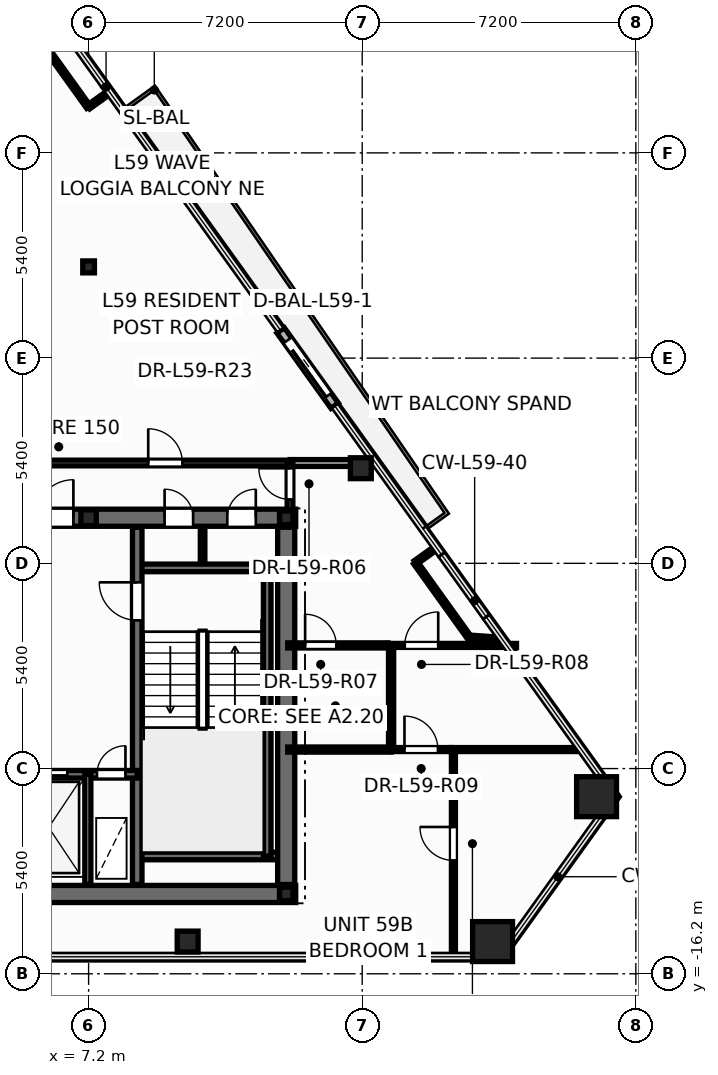
"""IFC4 building model, lengths in metres.
Left out: names, types, materials, properties, quantities, classifications, styles, units other than length and angle.
Written with IfcOpenShell. Run it as: python <this file> out.ifc"""

import sys

from ifc_helpers import new_model, si_unit, direction, frame, frame_2d, origin, origin_2d, place, context, subcontext, project, spatial, rectangle, hollow_rectangle, hollow_circle, i_section, extrude, element, fill, save


model = new_model("IFC4")
c1 = context("Model", 3, precision=1e-05, world=origin(), true_north=direction((0.0, 1.0)))
c2 = subcontext(c1, "Body", "Model", "MODEL_VIEW")
j1 = project(units=[si_unit("LENGTHUNIT", "METRE"), si_unit("PLANEANGLEUNIT", "RADIAN")], contexts=[c1])
p1 = place(None, origin())
s1 = spatial("IfcSite", under=j1, at=p1, CompositionType="ELEMENT")
p2 = place(p1, origin())
s2 = spatial("IfcBuilding", under=s1, at=p2, CompositionType="ELEMENT")
p3 = place(p2, frame((0.0, 0.0, 225.3)))
s3 = spatial("IfcBuildingStorey", under=s2, at=p3, CompositionType="ELEMENT", Elevation=225.3)
for number, where, z_axis, x_axis in (
    (1, (17.83, -15.352, 0.0), (0.0, 0.0, 1.0), (1.0, 0.0, 0.0)),
    (2, (20.567, -11.54, 0.0), (0.0, 0.0, 1.0), (1.0, 0.0, 0.0)),
):
    element("IfcColumn", number, at=place(p3, frame(where, z_axis=z_axis, x_axis=x_axis)), inside=s3, PredefinedType="COLUMN", context=c2, shape_type="SweptSolid", body=[
        extrude(hollow_rectangle(XDim=1.05, YDim=1.05, WallThickness=0.045, at=origin_2d()), origin(), (0.0, 0.0, 1.0), 3.6),
    ])
for number, where, z_axis, x_axis in (
    (3, (9.807, -15.352, 0.0), (0.0, 0.0, 1.0), (1.0, 0.0, 0.0)),
    (4, (14.363, -2.897, 0.0), (0.0, 0.0, 1.0), (1.0, 0.0, 0.0)),
    (5, (9.046, 4.51, 0.0), (0.0, 0.0, 1.0), (1.0, 0.0, 0.0)),
):
    element("IfcColumn", number, at=place(p3, frame(where, z_axis=z_axis, x_axis=x_axis)), inside=s3, PredefinedType="COLUMN", context=c2, shape_type="SweptSolid", body=[
        extrude(hollow_circle(Radius=0.275, WallThickness=0.024, at=origin_2d()), origin(), (0.0, 0.0, 1.0), 3.6),
    ])
for number, where, z_axis, x_axis in (
    (6, (12.4, -14.1, 0.0), (0.0, 0.0, 1.0), (1.0, 0.0, 0.0)),
    (7, (12.4, -4.2, 0.0), (0.0, 0.0, 1.0), (1.0, 0.0, 0.0)),
):
    element("IfcColumn", number, at=place(p3, frame(where, z_axis=z_axis, x_axis=x_axis)), inside=s3, PredefinedType="COLUMN", context=c2, shape_type="SweptSolid", body=[
        extrude(i_section(OverallWidth=0.352, OverallDepth=0.359, WebThickness=0.018, FlangeThickness=0.026, at=origin_2d()), origin(), (0.0, 0.0, 1.0), 3.6),
    ])
p4 = place(p3, frame((7.2, -4.2, 0.0), z_axis=(0.0, 0.0, 1.0), x_axis=(1.0, 0.0, 0.0)))
e8 = element("IfcColumn", 8, at=p4, inside=s3, PredefinedType="PILASTER", context=c2, shape_type="SweptSolid", body=[
    extrude(i_section(OverallWidth=0.405, OverallDepth=0.414, WebThickness=0.022, FlangeThickness=0.032, at=origin_2d()), origin(), (0.0, 0.0, 1.0), 3.6),
])
p5 = place(p3, frame((7.2, 2.4, 0.0), z_axis=(0.0, 0.0, 1.0), x_axis=(1.0, 0.0, 0.0)))
e9 = element("IfcColumn", 9, at=p5, inside=s3, PredefinedType="COLUMN", context=c2, shape_type="SweptSolid", body=[
    extrude(i_section(OverallWidth=0.307, OverallDepth=0.314, WebThickness=0.012, FlangeThickness=0.019, at=origin_2d()), origin(), (0.0, 0.0, 1.0), 3.6),
])
p6 = place(p3, frame((13.675, -1.252, -0.015), z_axis=(0.0, 0.0, 1.0), x_axis=(-0.583139062732, 0.812372349059, 0.0)))
e10 = element("IfcWall", 10, at=p6, inside=s3, PredefinedType="STANDARD", context=c2, shape_type="SweptSolid", body=[
    extrude(rectangle(XDim=2.44, YDim=0.24, at=frame_2d((1.22, 0.0))), origin(), (0.0, 0.0, 1.0), 2.853),
])
p7 = place(p6, frame((0.32, 0.0, 0.015)))
e11 = element("IfcOpeningElement", 11, at=p7, cuts=e10, PredefinedType="OPENING", context=c2, shape_type="SweptSolid", body=[
    extrude(rectangle(XDim=1.806, YDim=2.204, at=frame_2d((0.9, 1.102))), frame((0.0, 0.13, 0.0), z_axis=(0.0, -1.0, 0.0), x_axis=(1.0, 0.0, 0.0)), (0.0, 0.0, 1.0), 0.26),
])
p8 = place(p3, frame((10.2, -5.52, 0.0), z_axis=(0.0, 0.0, 1.0), x_axis=(0.0, 1.0, 0.0)))
e12 = element("IfcWall", 12, at=p8, inside=s3, PredefinedType="PARTITIONING", context=c2, shape_type="SweptSolid", body=[
    extrude(rectangle(XDim=1.12, YDim=0.12, at=frame_2d((0.56, 0.0))), origin(), (0.0, 0.0, 1.0), 3.32),
])
p9 = place(p3, frame((-12.65, -14.1, 0.0), z_axis=(0.0, 0.0, 1.0), x_axis=(1.0, 0.0, 0.0)))
e13 = element("IfcWall", 13, at=p9, inside=s3, PredefinedType="SHEAR", context=c2, shape_type="SweptSolid", body=[
    extrude(rectangle(XDim=25.3, YDim=0.45, at=frame_2d((12.65, 0.0))), origin(), (0.0, 0.0, 1.0), 3.6),
])
p10 = place(p3, frame((-12.65, -4.2, 0.0), z_axis=(0.0, 0.0, 1.0), x_axis=(1.0, 0.0, 0.0)))
e14 = element("IfcWall", 14, at=p10, inside=s3, PredefinedType="SHEAR", context=c2, shape_type="SweptSolid", body=[
    extrude(rectangle(XDim=25.3, YDim=0.45, at=frame_2d((12.65, 0.0))), origin(), (0.0, 0.0, 1.0), 3.6),
])
p11 = place(p10, frame((0.95, 0.0, 0.0)))
e15 = element("IfcOpeningElement", 15, at=p11, cuts=e14, PredefinedType="OPENING", context=c2, shape_type="SweptSolid", body=[
    extrude(rectangle(XDim=0.756, YDim=2.054, at=frame_2d((0.375, 1.027))), frame((0.0, 0.235, 0.0), z_axis=(0.0, -1.0, 0.0), x_axis=(1.0, 0.0, 0.0)), (0.0, 0.0, 1.0), 0.47),
])
p12 = place(p10, frame((2.6, 0.0, 0.0)))
e16 = element("IfcOpeningElement", 16, at=p12, cuts=e14, PredefinedType="OPENING", context=c2, shape_type="SweptSolid", body=[
    extrude(rectangle(XDim=0.756, YDim=2.054, at=frame_2d((0.375, 1.027))), frame((0.0, 0.235, 0.0), z_axis=(0.0, -1.0, 0.0), x_axis=(1.0, 0.0, 0.0)), (0.0, 0.0, 1.0), 0.47),
])
p13 = place(p10, frame((21.85, 0.0, 0.0)))
e17 = element("IfcOpeningElement", 17, at=p13, cuts=e14, PredefinedType="OPENING", context=c2, shape_type="SweptSolid", body=[
    extrude(rectangle(XDim=0.756, YDim=2.054, at=frame_2d((0.375, 1.027))), frame((0.0, 0.235, 0.0), z_axis=(0.0, -1.0, 0.0), x_axis=(1.0, 0.0, 0.0)), (0.0, 0.0, 1.0), 0.47),
])
p14 = place(p10, frame((23.5, 0.0, 0.0)))
e18 = element("IfcOpeningElement", 18, at=p14, cuts=e14, PredefinedType="OPENING", context=c2, shape_type="SweptSolid", body=[
    extrude(rectangle(XDim=0.756, YDim=2.054, at=frame_2d((0.375, 1.027))), frame((0.0, 0.235, 0.0), z_axis=(0.0, -1.0, 0.0), x_axis=(1.0, 0.0, 0.0)), (0.0, 0.0, 1.0), 0.47),
])
p15 = place(p10, frame((5.85, 0.0, 0.0)))
e19 = element("IfcOpeningElement", 19, at=p15, cuts=e14, PredefinedType="OPENING", context=c2, shape_type="SweptSolid", body=[
    extrude(rectangle(XDim=1.006, YDim=2.104, at=frame_2d((0.5, 1.052))), frame((0.0, 0.235, 0.0), z_axis=(0.0, -1.0, 0.0), x_axis=(1.0, 0.0, 0.0)), (0.0, 0.0, 1.0), 0.47),
])
p16 = place(p10, frame((10.35, 0.0, 0.0)))
e20 = element("IfcOpeningElement", 20, at=p16, cuts=e14, PredefinedType="OPENING", context=c2, shape_type="SweptSolid", body=[
    extrude(rectangle(XDim=1.406, YDim=2.154, at=frame_2d((0.7, 1.077))), frame((0.0, 0.235, 0.0), z_axis=(0.0, -1.0, 0.0), x_axis=(1.0, 0.0, 0.0)), (0.0, 0.0, 1.0), 0.47),
])
p17 = place(p10, frame((18.45, 0.0, 0.0)))
e21 = element("IfcOpeningElement", 21, at=p17, cuts=e14, PredefinedType="OPENING", context=c2, shape_type="SweptSolid", body=[
    extrude(rectangle(XDim=1.006, YDim=2.104, at=frame_2d((0.5, 1.052))), frame((0.0, 0.235, 0.0), z_axis=(0.0, -1.0, 0.0), x_axis=(1.0, 0.0, 0.0)), (0.0, 0.0, 1.0), 0.47),
])
for number, where, z_axis, x_axis in (
    (22, (8.48, -5.52, 0.0), (0.0, 0.0, 1.0), (1.0, 0.0, 0.0)),
    (23, (8.48, -13.1, 0.0), (0.0, 0.0, 1.0), (1.0, 0.0, 0.0)),
):
    element("IfcWall", number, at=place(p3, frame(where, z_axis=z_axis, x_axis=x_axis)), inside=s3, PredefinedType="SOLIDWALL", context=c2, shape_type="SweptSolid", body=[
        extrude(rectangle(XDim=3.87, YDim=0.2, at=frame_2d((1.935, 0.0))), origin(), (0.0, 0.0, 1.0), 3.6),
    ])
p18 = place(p3, frame((11.9, -13.1, 0.0), z_axis=(0.0, 0.0, 1.0), x_axis=(0.0, 1.0, 0.0)))
e24 = element("IfcWall", 24, at=p18, inside=s3, PredefinedType="SOLIDWALL", context=c2, shape_type="SweptSolid", body=[
    extrude(rectangle(XDim=7.58, YDim=0.2, at=frame_2d((3.79, 0.0))), origin(), (0.0, 0.0, 1.0), 3.6),
])
p19 = place(p3, frame((8.48, -13.85, 0.0), z_axis=(0.0, 0.0, 1.0), x_axis=(0.0, 1.0, 0.0)))
e25 = element("IfcWall", 25, at=p19, inside=s3, PredefinedType="SHEAR", context=c2, shape_type="SweptSolid", body=[
    extrude(rectangle(XDim=9.4, YDim=0.25, at=frame_2d((4.7, 0.0))), origin(), (0.0, 0.0, 1.0), 3.6),
])
p20 = place(p19, frame((6.95, 0.0, 0.0)))
e26 = element("IfcOpeningElement", 26, at=p20, cuts=e25, PredefinedType="OPENING", context=c2, shape_type="SweptSolid", body=[
    extrude(rectangle(XDim=1.006, YDim=2.104, at=frame_2d((0.5, 1.052))), frame((0.0, 0.135, 0.0), z_axis=(0.0, -1.0, 0.0), x_axis=(1.0, 0.0, 0.0)), (0.0, 0.0, 1.0), 0.27),
])
p21 = place(p3, frame((5.12, -10.95, 0.0), z_axis=(0.0, 0.0, 1.0), x_axis=(1.0, 0.0, 0.0)))
e27 = element("IfcWall", 27, at=p21, inside=s3, PredefinedType="SOLIDWALL", context=c2, shape_type="SweptSolid", body=[
    extrude(rectangle(XDim=3.36, YDim=0.2, at=frame_2d((1.68, 0.0))), origin(), (0.0, 0.0, 1.0), 3.6),
])
p22 = place(p21, frame((0.42, 0.0, 0.0)))
e28 = element("IfcOpeningElement", 28, at=p22, cuts=e27, PredefinedType="OPENING", context=c2, shape_type="SweptSolid", body=[
    extrude(rectangle(XDim=1.106, YDim=2.104, at=frame_2d((0.55, 1.052))), frame((0.0, 0.11, 0.0), z_axis=(0.0, -1.0, 0.0), x_axis=(1.0, 0.0, 0.0)), (0.0, 0.0, 1.0), 0.22),
])
p23 = place(p21, frame((2.3, 0.0, 0.0)))
e29 = element("IfcOpeningElement", 29, at=p23, cuts=e27, PredefinedType="OPENING", context=c2, shape_type="SweptSolid", body=[
    extrude(rectangle(XDim=0.756, YDim=2.054, at=frame_2d((0.375, 1.027))), frame((0.0, 0.11, 0.0), z_axis=(0.0, -1.0, 0.0), x_axis=(1.0, 0.0, 0.0)), (0.0, 0.0, 1.0), 0.22),
])
p24 = place(p3, frame((7.18, -13.85, 0.0), z_axis=(0.0, 0.0, 1.0), x_axis=(0.0, 1.0, 0.0)))
e30 = element("IfcWall", 30, at=p24, inside=s3, PredefinedType="PARTITIONING", context=c2, shape_type="SweptSolid", body=[
    extrude(rectangle(XDim=2.9, YDim=0.16, at=frame_2d((1.45, 0.0))), origin(), (0.0, 0.0, 1.0), 2.545),
])
p25 = place(p3, frame((12.4, -13.85, 0.0), z_axis=(0.0, 0.0, 1.0), x_axis=(0.0, 1.0, 0.0)))
e31 = element("IfcWall", 31, at=p25, inside=s3, PredefinedType="SHEAR", context=c2, shape_type="SweptSolid", body=[
    extrude(rectangle(XDim=9.4, YDim=0.45, at=frame_2d((4.7, 0.0))), origin(), (0.0, 0.0, 1.0), 3.6),
])
p26 = place(p3, frame((5.34, -2.76, 0.0), z_axis=(0.0, 0.0, 1.0), x_axis=(1.0, 0.0, 0.0)))
e32 = element("IfcWall", 32, at=p26, inside=s3, PredefinedType="PARTITIONING", context=c2, shape_type="SweptSolid", body=[
    extrude(rectangle(XDim=7.16, YDim=0.15, at=frame_2d((3.58, 0.0))), origin(), (0.0, 0.0, 1.0), 2.295),
])
p27 = place(p26, frame((3.429, 0.0, 0.0)))
e33 = element("IfcOpeningElement", 33, at=p27, cuts=e32, PredefinedType="OPENING", context=c2, shape_type="SweptSolid", body=[
    extrude(rectangle(XDim=0.906, YDim=2.104, at=frame_2d((0.45, 1.052))), frame((0.0, 0.085, 0.0), z_axis=(0.0, -1.0, 0.0), x_axis=(1.0, 0.0, 0.0)), (0.0, 0.0, 1.0), 0.17),
])
p28 = place(p3, frame((16.8, -15.752, 0.0), z_axis=(0.0, 0.0, 1.0), x_axis=(0.0, 1.0, 0.0)))
e34 = element("IfcWall", 34, at=p28, inside=s3, PredefinedType="PARTITIONING", context=c2, shape_type="SweptSolid", body=[
    extrude(rectangle(XDim=5.452, YDim=0.105, at=frame_2d((2.726, 0.0))), origin(), (0.0, 0.0, 1.0), 2.838),
])
p29 = place(p28, frame((2.536, 0.0, 0.0)))
e35 = element("IfcOpeningElement", 35, at=p29, cuts=e34, PredefinedType="OPENING", context=c2, shape_type="SweptSolid", body=[
    extrude(rectangle(XDim=0.886, YDim=2.104, at=frame_2d((0.44, 1.052))), frame((0.0, 0.062, 0.0), z_axis=(0.0, -1.0, 0.0), x_axis=(1.0, 0.0, 0.0)), (0.0, 0.0, 1.0), 0.125),
])
p30 = place(p3, frame((16.74, -10.3, 0.0), z_axis=(0.0, 0.0, 1.0), x_axis=(1.0, 0.0, 0.0)))
e36 = element("IfcWall", 36, at=p30, inside=s3, PredefinedType="PARTITIONING", context=c2, shape_type="SweptSolid", body=[
    extrude(rectangle(XDim=3.429, YDim=0.105, at=frame_2d((1.715, 0.0))), origin(), (0.0, 0.0, 1.0), 2.295),
])
p31 = place(p3, frame((15.08, -7.56, 0.0), z_axis=(0.0, 0.0, 1.0), x_axis=(1.0, 0.0, 0.0)))
e37 = element("IfcWall", 37, at=p31, inside=s3, PredefinedType="PARTITIONING", context=c2, shape_type="SweptSolid", body=[
    extrude(rectangle(XDim=3.38, YDim=0.105, at=frame_2d((1.69, 0.0))), origin(), (0.0, 0.0, 1.0), 2.295),
])
p32 = place(p31, frame((0.44, 0.0, 0.0)))
e38 = element("IfcOpeningElement", 38, at=p32, cuts=e37, PredefinedType="OPENING", context=c2, shape_type="SweptSolid", body=[
    extrude(rectangle(XDim=0.886, YDim=2.104, at=frame_2d((0.44, 1.052))), frame((0.0, 0.062, 0.0), z_axis=(0.0, -1.0, 0.0), x_axis=(1.0, 0.0, 0.0)), (0.0, 0.0, 1.0), 0.125),
])
p33 = place(p3, frame((12.44, -7.56, 0.0), z_axis=(0.0, 0.0, 1.0), x_axis=(1.0, 0.0, 0.0)))
e39 = element("IfcWall", 39, at=p33, inside=s3, PredefinedType="PARTITIONING", context=c2, shape_type="SweptSolid", body=[
    extrude(rectangle(XDim=2.638, YDim=0.135, at=frame_2d((1.319, 0.0))), origin(), (0.0, 0.0, 1.0), 2.838),
])
p34 = place(p33, frame((0.458, 0.0, 0.0)))
e40 = element("IfcOpeningElement", 40, at=p34, cuts=e39, PredefinedType="OPENING", context=c2, shape_type="SweptSolid", body=[
    extrude(rectangle(XDim=0.826, YDim=2.104, at=frame_2d((0.41, 1.052))), frame((0.0, 0.078, 0.0), z_axis=(0.0, -1.0, 0.0), x_axis=(1.0, 0.0, 0.0)), (0.0, 0.0, 1.0), 0.155),
])
p35 = place(p3, frame((15.16, -10.3, 0.0), z_axis=(0.0, 0.0, 1.0), x_axis=(0.0, 1.0, 0.0)))
e41 = element("IfcWall", 41, at=p35, inside=s3, PredefinedType="PARTITIONING", context=c2, shape_type="SweptSolid", body=[
    extrude(rectangle(XDim=2.74, YDim=0.135, at=frame_2d((1.37, 0.0))), origin(), (0.0, 0.0, 1.0), 3.32),
])
p36 = place(p3, frame((12.44, -10.3, 0.0), z_axis=(0.0, 0.0, 1.0), x_axis=(1.0, 0.0, 0.0)))
e42 = element("IfcWall", 42, at=p36, inside=s3, PredefinedType="PARTITIONING", context=c2, shape_type="SweptSolid", body=[
    extrude(rectangle(XDim=2.72, YDim=0.135, at=frame_2d((1.36, 0.0))), origin(), (0.0, 0.0, 1.0), 2.838),
])
p37 = place(p3, frame((7.197, 6.607, 0.0), z_axis=(0.0, 0.0, 1.0), x_axis=(-0.583135111371, 0.81237518542, 0.0)))
e43 = element("IfcWall", 43, at=p37, inside=s3, PredefinedType="PARTITIONING", context=c2, shape_type="SweptSolid", body=[
    extrude(rectangle(XDim=2.421, YDim=0.12, at=frame_2d((1.21, 0.0))), origin(), (0.0, 0.0, 1.0), 3.32),
])
p38 = place(p3, frame((12.5, -2.76, 0.0), z_axis=(0.0, 0.0, 1.0), x_axis=(1.0, 0.0, 0.0)))
e44 = element("IfcWall", 44, at=p38, inside=s3, PredefinedType="PARTITIONING", context=c2, shape_type="SweptSolid", body=[
    extrude(rectangle(XDim=2.257, YDim=0.18, at=frame_2d((1.129, 0.0))), origin(), (0.0, 0.0, 1.0), 2.595),
])
p39 = place(p3, frame((17.213, -7.347, 0.0), z_axis=(0.0, 0.0, 1.0), x_axis=(-0.583201664134, 0.812327408716, 0.0)))
e45 = element("IfcWall", 45, at=p39, inside=s3, PredefinedType="PARTITIONING", context=c2, shape_type="SweptSolid", body=[
    extrude(rectangle(XDim=2.421, YDim=0.12, at=frame_2d((1.21, 0.0))), origin(), (0.0, 0.0, 1.0), 3.32),
])
p40 = place(p3, frame((15.16, -10.3, 0.0), z_axis=(0.0, 0.0, 1.0), x_axis=(1.0, 0.0, 0.0)))
e46 = element("IfcWall", 46, at=p40, inside=s3, PredefinedType="PARTITIONING", context=c2, shape_type="SweptSolid", body=[
    extrude(rectangle(XDim=1.578, YDim=0.105, at=frame_2d((0.789, 0.0))), origin(), (0.0, 0.0, 1.0), 3.32),
])
p41 = place(p40, frame((0.352, 0.0, 0.0)))
e47 = element("IfcOpeningElement", 47, at=p41, cuts=e46, PredefinedType="OPENING", context=c2, shape_type="SweptSolid", body=[
    extrude(rectangle(XDim=0.886, YDim=2.104, at=frame_2d((0.44, 1.052))), frame((0.0, 0.062, 0.0), z_axis=(0.0, -1.0, 0.0), x_axis=(1.0, 0.0, 0.0)), (0.0, 0.0, 1.0), 0.125),
])
p42 = place(p3, frame((12.5, -4.24, 0.0), z_axis=(0.0, 0.0, 1.0), x_axis=(0.0, 1.0, 0.0)))
e48 = element("IfcWall", 48, at=p42, inside=s3, PredefinedType="PARTITIONING", context=c2, shape_type="SweptSolid", body=[
    extrude(rectangle(XDim=1.48, YDim=0.15, at=frame_2d((0.74, 0.0))), origin(), (0.0, 0.0, 1.0), 2.295),
])
p43 = place(p42, frame((0.522, 0.0, 0.0)))
e49 = element("IfcOpeningElement", 49, at=p43, cuts=e48, PredefinedType="OPENING", context=c2, shape_type="SweptSolid", body=[
    extrude(rectangle(XDim=0.826, YDim=2.104, at=frame_2d((0.41, 1.052))), frame((0.0, 0.085, 0.0), z_axis=(0.0, -1.0, 0.0), x_axis=(1.0, 0.0, 0.0)), (0.0, 0.0, 1.0), 0.17),
])
p44 = place(p3, frame((18.081, -7.407, 0.0), z_axis=(0.0, 0.0, 1.0), x_axis=(-0.997593647417, 0.069331916407, 0.0)))
e50 = element("IfcWall", 50, at=p44, inside=s3, PredefinedType="PARTITIONING", context=c2, shape_type="SweptSolid", body=[
    extrude(rectangle(XDim=0.87, YDim=0.12, at=frame_2d((0.435, 0.0))), origin(), (0.0, 0.0, 1.0), 2.838),
])
p45 = place(p3, frame((15.801, -5.38, 0.0), z_axis=(0.0, 0.0, 1.0), x_axis=(0.812328158573, 0.583200619675, 0.0)))
e51 = element("IfcWall", 51, at=p45, inside=s3, PredefinedType="PARTITIONING", context=c2, shape_type="SweptSolid", body=[
    extrude(rectangle(XDim=0.67, YDim=0.12, at=frame_2d((0.335, 0.0))), origin(), (0.0, 0.0, 1.0), 2.838),
])
p46 = place(p3, frame((7.741, 6.998, 0.0), z_axis=(0.0, 0.0, 1.0), x_axis=(-0.812549510699, -0.582892179277, 0.0)))
e52 = element("IfcWall", 52, at=p46, inside=s3, PredefinedType="PARTITIONING", context=c2, shape_type="SweptSolid", body=[
    extrude(rectangle(XDim=0.67, YDim=0.12, at=frame_2d((0.335, 0.0))), origin(), (0.0, 0.0, 1.0), 2.838),
])
p47 = place(p7, origin())
e53 = element("IfcDoor", 53, at=p47, inside=s3, OperationType="SLIDING_TO_LEFT", PredefinedType="DOOR", context=c2, shape_type="SweptSolid", body=[
    extrude(rectangle(XDim=1.8, YDim=2.2, at=frame_2d((0.9, 1.1))), frame((0.0, 0.025, 0.0), z_axis=(0.0, -1.0, 0.0), x_axis=(1.0, 0.0, 0.0)), (0.0, 0.0, 1.0), 0.05),
])
fill(e11, e53)
p48 = place(p20, origin())
e54 = element("IfcDoor", 54, at=p48, inside=s3, OperationType="SINGLE_SWING_RIGHT", PredefinedType="DOOR", context=c2, shape_type="SweptSolid", body=[
    extrude(rectangle(XDim=1.0, YDim=2.1, at=frame_2d((0.5, 1.05))), frame((0.0, 0.025, 0.0), z_axis=(0.0, -1.0, 0.0), x_axis=(1.0, 0.0, 0.0)), (0.0, 0.0, 1.0), 0.05),
])
fill(e26, e54)
p49 = place(p22, origin())
e55 = element("IfcDoor", 55, at=p49, inside=s3, OperationType="DOUBLE_DOOR_SLIDING", PredefinedType="DOOR", context=c2, shape_type="SweptSolid", body=[
    extrude(rectangle(XDim=1.1, YDim=2.1, at=frame_2d((0.55, 1.05))), frame((0.0, 0.025, 0.0), z_axis=(0.0, -1.0, 0.0), x_axis=(1.0, 0.0, 0.0)), (0.0, 0.0, 1.0), 0.05),
])
fill(e28, e55)
p50 = place(p23, origin())
e56 = element("IfcDoor", 56, at=p50, inside=s3, OperationType="SINGLE_SWING_RIGHT", PredefinedType="DOOR", context=c2, shape_type="SweptSolid", body=[
    extrude(rectangle(XDim=0.75, YDim=2.05, at=frame_2d((0.375, 1.025))), frame((0.0, 0.025, 0.0), z_axis=(0.0, -1.0, 0.0), x_axis=(1.0, 0.0, 0.0)), (0.0, 0.0, 1.0), 0.05),
])
fill(e29, e56)
p51 = place(p13, origin())
e57 = element("IfcDoor", 57, at=p51, inside=s3, OperationType="SINGLE_SWING_LEFT", PredefinedType="DOOR", context=c2, shape_type="SweptSolid", body=[
    extrude(rectangle(XDim=0.75, YDim=2.05, at=frame_2d((0.375, 1.025))), frame((0.0, 0.025, 0.0), z_axis=(0.0, -1.0, 0.0), x_axis=(1.0, 0.0, 0.0)), (0.0, 0.0, 1.0), 0.05),
])
fill(e17, e57)
p52 = place(p14, origin())
e58 = element("IfcDoor", 58, at=p52, inside=s3, OperationType="SINGLE_SWING_RIGHT", PredefinedType="DOOR", context=c2, shape_type="SweptSolid", body=[
    extrude(rectangle(XDim=0.75, YDim=2.05, at=frame_2d((0.375, 1.025))), frame((0.0, 0.025, 0.0), z_axis=(0.0, -1.0, 0.0), x_axis=(1.0, 0.0, 0.0)), (0.0, 0.0, 1.0), 0.05),
])
fill(e18, e58)
p53 = place(p17, origin())
e59 = element("IfcDoor", 59, at=p53, inside=s3, OperationType="SINGLE_SWING_RIGHT", PredefinedType="DOOR", context=c2, shape_type="SweptSolid", body=[
    extrude(rectangle(XDim=1.0, YDim=2.1, at=frame_2d((0.5, 1.05))), frame((0.0, 0.025, 0.0), z_axis=(0.0, -1.0, 0.0), x_axis=(1.0, 0.0, 0.0)), (0.0, 0.0, 1.0), 0.05),
])
fill(e21, e59)
p54 = place(p43, origin())
e60 = element("IfcDoor", 60, at=p54, inside=s3, OperationType="SINGLE_SWING_RIGHT", PredefinedType="DOOR", context=c2, shape_type="SweptSolid", body=[
    extrude(rectangle(XDim=0.82, YDim=2.1, at=frame_2d((0.41, 1.05))), frame((0.0, 0.025, 0.0), z_axis=(0.0, -1.0, 0.0), x_axis=(1.0, 0.0, 0.0)), (0.0, 0.0, 1.0), 0.05),
])
fill(e49, e60)
p55 = place(p34, origin())
e61 = element("IfcDoor", 61, at=p55, inside=s3, OperationType="SINGLE_SWING_LEFT", PredefinedType="DOOR", context=c2, shape_type="SweptSolid", body=[
    extrude(rectangle(XDim=0.82, YDim=2.1, at=frame_2d((0.41, 1.05))), frame((0.0, 0.025, 0.0), z_axis=(0.0, -1.0, 0.0), x_axis=(1.0, 0.0, 0.0)), (0.0, 0.0, 1.0), 0.05),
])
fill(e40, e61)
p56 = place(p32, origin())
e62 = element("IfcDoor", 62, at=p56, inside=s3, OperationType="SINGLE_SWING_RIGHT", PredefinedType="DOOR", context=c2, shape_type="SweptSolid", body=[
    extrude(rectangle(XDim=0.88, YDim=2.1, at=frame_2d((0.44, 1.05))), frame((0.0, 0.025, 0.0), z_axis=(0.0, -1.0, 0.0), x_axis=(1.0, 0.0, 0.0)), (0.0, 0.0, 1.0), 0.05),
])
fill(e38, e62)
p57 = place(p41, origin())
e63 = element("IfcDoor", 63, at=p57, inside=s3, OperationType="SINGLE_SWING_LEFT", PredefinedType="DOOR", context=c2, shape_type="SweptSolid", body=[
    extrude(rectangle(XDim=0.88, YDim=2.1, at=frame_2d((0.44, 1.05))), frame((0.0, 0.025, 0.0), z_axis=(0.0, -1.0, 0.0), x_axis=(1.0, 0.0, 0.0)), (0.0, 0.0, 1.0), 0.05),
])
fill(e47, e63)
p58 = place(p29, origin())
e64 = element("IfcDoor", 64, at=p58, inside=s3, OperationType="SINGLE_SWING_RIGHT", PredefinedType="DOOR", context=c2, shape_type="SweptSolid", body=[
    extrude(rectangle(XDim=0.88, YDim=2.1, at=frame_2d((0.44, 1.05))), frame((0.0, 0.025, 0.0), z_axis=(0.0, -1.0, 0.0), x_axis=(1.0, 0.0, 0.0)), (0.0, 0.0, 1.0), 0.05),
])
fill(e35, e64)
p59 = place(p27, origin())
e65 = element("IfcDoor", 65, at=p59, inside=s3, OperationType="SINGLE_SWING_LEFT", PredefinedType="DOOR", context=c2, shape_type="SweptSolid", body=[
    extrude(rectangle(XDim=0.9, YDim=2.1, at=frame_2d((0.45, 1.05))), frame((0.0, 0.025, 0.0), z_axis=(0.0, -1.0, 0.0), x_axis=(1.0, 0.0, 0.0)), (0.0, 0.0, 1.0), 0.05),
])
fill(e33, e65)
save(model, sys.argv[1])
